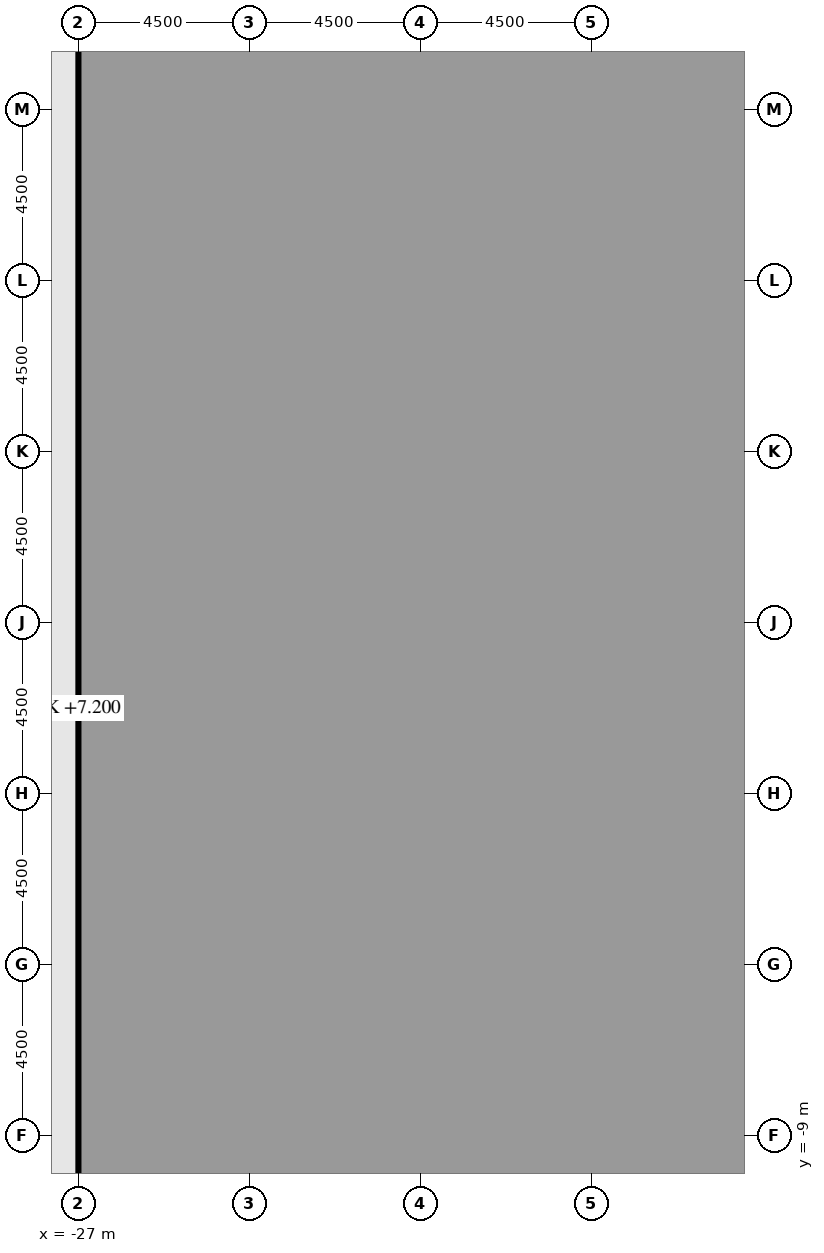
"""IFC4 building model, lengths in metres.
Left out: names, types, materials, properties, quantities, classifications, styles, units other than length and angle.
Written with IfcOpenShell. Run it as: python <this file> out.ifc"""

import sys

from ifc_helpers import new_model, si_unit, direction, frame, frame_2d, origin, origin_2d, place, context, subcontext, project, spatial, rectangle, extrude, element, fill, save


model = new_model("IFC4")
c1 = context("Model", 3, precision=1e-05, world=origin(), true_north=direction((0.0, 1.0)))
c2 = subcontext(c1, "Body", "Model", "MODEL_VIEW")
j1 = project(units=[si_unit("LENGTHUNIT", "METRE"), si_unit("PLANEANGLEUNIT", "RADIAN")], contexts=[c1])
p1 = place(None, origin())
s1 = spatial("IfcSite", under=j1, at=p1, CompositionType="ELEMENT")
p2 = place(p1, origin())
s2 = spatial("IfcBuilding", under=s1, at=p2, CompositionType="ELEMENT")
p3 = place(p2, frame((0.0, 0.0, 7.2)))
s3 = spatial("IfcBuildingStorey", under=s2, at=p3, CompositionType="ELEMENT", Elevation=7.2)
for number, where, z_axis, x_axis in (
    (1, (-27.0, -9.0, -0.45), (0.0, 0.0, 1.0), (1.0, 0.0, 0.0)),
    (2, (-27.0, -4.5, -0.45), (0.0, 0.0, 1.0), (1.0, 0.0, 0.0)),
    (3, (-27.0, 0.0, -0.45), (0.0, 0.0, 1.0), (1.0, 0.0, 0.0)),
    (4, (-27.0, 4.5, -0.45), (0.0, 0.0, 1.0), (1.0, 0.0, 0.0)),
    (5, (-27.0, 9.0, -0.45), (0.0, 0.0, 1.0), (1.0, 0.0, 0.0)),
    (6, (-27.0, 13.5, -0.45), (0.0, 0.0, 1.0), (1.0, 0.0, 0.0)),
    (7, (-27.0, 18.0, -0.45), (0.0, 0.0, 1.0), (1.0, 0.0, 0.0)),
):
    element("IfcColumn", number, at=place(p3, frame(where, z_axis=z_axis, x_axis=x_axis)), inside=s3, PredefinedType="COLUMN", context=c2, shape_type="SweptSolid", body=[
        extrude(rectangle(XDim=1.4, YDim=1.4, at=origin_2d()), origin(), (0.0, 0.0, 1.0), 4.55),
    ])
for number, where, z_axis, x_axis in (
    (8, (-18.0, -9.0, 0.0), (0.0, 0.0, 1.0), (1.0, 0.0, 0.0)),
    (9, (-18.0, 0.0, 0.0), (0.0, 0.0, 1.0), (1.0, 0.0, 0.0)),
    (10, (-18.0, 9.0, 0.0), (0.0, 0.0, 1.0), (1.0, 0.0, 0.0)),
    (11, (-18.0, 18.0, 0.0), (0.0, 0.0, 1.0), (1.0, 0.0, 0.0)),
):
    element("IfcColumn", number, at=place(p3, frame(where, z_axis=z_axis, x_axis=x_axis)), inside=s3, PredefinedType="COLUMN", context=c2, shape_type="SweptSolid", body=[
        extrude(rectangle(XDim=1.6, YDim=1.6, at=origin_2d()), origin(), (0.0, 0.0, 1.0), 4.1),
    ])
p4 = place(p3, frame((-10.0, -9.0, 0.0), z_axis=(0.0, 0.0, 1.0), x_axis=(0.0, 1.0, 0.0)))
e12 = element("IfcWall", 12, at=p4, inside=s3, PredefinedType="SHEAR", context=c2, shape_type="SweptSolid", body=[
    extrude(rectangle(XDim=27.5, YDim=1.0, at=frame_2d((13.75, 0.0))), origin(), (0.0, 0.0, 1.0), 4.1),
])
p5 = place(p4, frame((12.55, 0.0, 0.0)))
e13 = element("IfcOpeningElement", 13, at=p5, cuts=e12, PredefinedType="OPENING", context=c2, shape_type="SweptSolid", body=[
    extrude(rectangle(XDim=2.4, YDim=2.4, at=frame_2d((1.2, 1.2))), frame((0.0, 0.51, 0.0), z_axis=(0.0, -1.0, 0.0), x_axis=(1.0, 0.0, 0.0)), (0.0, 0.0, 1.0), 1.02),
])
p6 = place(p4, frame((6.825, 0.0, 0.0)))
e14 = element("IfcOpeningElement", 14, at=p6, cuts=e12, PredefinedType="OPENING", context=c2, shape_type="SweptSolid", body=[
    extrude(rectangle(XDim=1.2, YDim=2.1, at=frame_2d((0.6, 1.05))), frame((0.0, 0.51, 0.0), z_axis=(0.0, -1.0, 0.0), x_axis=(1.0, 0.0, 0.0)), (0.0, 0.0, 1.0), 1.02),
])
p7 = place(p4, frame((19.475, 0.0, 0.0)))
e15 = element("IfcOpeningElement", 15, at=p7, cuts=e12, PredefinedType="OPENING", context=c2, shape_type="SweptSolid", body=[
    extrude(rectangle(XDim=1.2, YDim=2.1, at=frame_2d((0.6, 1.05))), frame((0.0, 0.51, 0.0), z_axis=(0.0, -1.0, 0.0), x_axis=(1.0, 0.0, 0.0)), (0.0, 0.0, 1.0), 1.02),
])
p8 = place(p3, frame((-27.0, 18.7, 0.0), z_axis=(0.0, 0.0, 1.0), x_axis=(0.0, 1.0, 0.0)))
e16 = element("IfcWall", 16, at=p8, inside=s3, PredefinedType="SOLIDWALL", context=c2, shape_type="SweptSolid", body=[
    extrude(rectangle(XDim=3.1, YDim=0.3, at=frame_2d((1.55, 0.0))), origin(), (0.0, 0.0, 1.0), 2.75),
])
p9 = place(p8, frame((0.125, 0.0, 0.8)))
e17 = element("IfcOpeningElement", 17, at=p9, cuts=e16, PredefinedType="OPENING", context=c2, shape_type="SweptSolid", body=[
    extrude(rectangle(XDim=2.4, YDim=1.7, at=frame_2d((1.2, 0.85))), frame((0.0, 0.16, 0.0), z_axis=(0.0, -1.0, 0.0), x_axis=(1.0, 0.0, 0.0)), (0.0, 0.0, 1.0), 0.32),
])
p10 = place(p3, frame((-27.0, 14.2, 0.0), z_axis=(0.0, 0.0, 1.0), x_axis=(0.0, 1.0, 0.0)))
e18 = element("IfcWall", 18, at=p10, inside=s3, PredefinedType="SOLIDWALL", context=c2, shape_type="SweptSolid", body=[
    extrude(rectangle(XDim=3.1, YDim=0.3, at=frame_2d((1.55, 0.0))), origin(), (0.0, 0.0, 1.0), 2.75),
])
p11 = place(p10, frame((1.05, 0.0, 0.0)))
e19 = element("IfcOpeningElement", 19, at=p11, cuts=e18, PredefinedType="OPENING", context=c2, shape_type="SweptSolid", body=[
    extrude(rectangle(XDim=1.0, YDim=2.2, at=frame_2d((0.5, 1.1))), frame((0.0, 0.16, 0.0), z_axis=(0.0, -1.0, 0.0), x_axis=(1.0, 0.0, 0.0)), (0.0, 0.0, 1.0), 0.32),
])
p12 = place(p3, frame((-27.0, 9.7, 0.0), z_axis=(0.0, 0.0, 1.0), x_axis=(0.0, 1.0, 0.0)))
e20 = element("IfcWall", 20, at=p12, inside=s3, PredefinedType="SOLIDWALL", context=c2, shape_type="SweptSolid", body=[
    extrude(rectangle(XDim=3.1, YDim=0.3, at=frame_2d((1.55, 0.0))), origin(), (0.0, 0.0, 1.0), 2.75),
])
p13 = place(p12, frame((0.35, 0.0, 0.8)))
e21 = element("IfcOpeningElement", 21, at=p13, cuts=e20, PredefinedType="OPENING", context=c2, shape_type="SweptSolid", body=[
    extrude(rectangle(XDim=2.4, YDim=1.7, at=frame_2d((1.2, 0.85))), frame((0.0, 0.16, 0.0), z_axis=(0.0, -1.0, 0.0), x_axis=(1.0, 0.0, 0.0)), (0.0, 0.0, 1.0), 0.32),
])
p14 = place(p3, frame((-27.0, 5.2, 0.0), z_axis=(0.0, 0.0, 1.0), x_axis=(0.0, 1.0, 0.0)))
e22 = element("IfcWall", 22, at=p14, inside=s3, PredefinedType="SOLIDWALL", context=c2, shape_type="SweptSolid", body=[
    extrude(rectangle(XDim=3.1, YDim=0.3, at=frame_2d((1.55, 0.0))), origin(), (0.0, 0.0, 1.0), 2.75),
])
p15 = place(p14, frame((0.35, 0.0, 0.8)))
e23 = element("IfcOpeningElement", 23, at=p15, cuts=e22, PredefinedType="OPENING", context=c2, shape_type="SweptSolid", body=[
    extrude(rectangle(XDim=2.4, YDim=1.7, at=frame_2d((1.2, 0.85))), frame((0.0, 0.16, 0.0), z_axis=(0.0, -1.0, 0.0), x_axis=(1.0, 0.0, 0.0)), (0.0, 0.0, 1.0), 0.32),
])
p16 = place(p3, frame((-27.0, 0.7, 0.0), z_axis=(0.0, 0.0, 1.0), x_axis=(0.0, 1.0, 0.0)))
e24 = element("IfcWall", 24, at=p16, inside=s3, PredefinedType="SOLIDWALL", context=c2, shape_type="SweptSolid", body=[
    extrude(rectangle(XDim=3.1, YDim=0.3, at=frame_2d((1.55, 0.0))), origin(), (0.0, 0.0, 1.0), 2.75),
])
p17 = place(p16, frame((0.35, 0.0, 0.8)))
e25 = element("IfcOpeningElement", 25, at=p17, cuts=e24, PredefinedType="OPENING", context=c2, shape_type="SweptSolid", body=[
    extrude(rectangle(XDim=2.4, YDim=1.7, at=frame_2d((1.2, 0.85))), frame((0.0, 0.16, 0.0), z_axis=(0.0, -1.0, 0.0), x_axis=(1.0, 0.0, 0.0)), (0.0, 0.0, 1.0), 0.32),
])
p18 = place(p3, frame((-27.0, -3.8, 0.0), z_axis=(0.0, 0.0, 1.0), x_axis=(0.0, 1.0, 0.0)))
e26 = element("IfcWall", 26, at=p18, inside=s3, PredefinedType="SOLIDWALL", context=c2, shape_type="SweptSolid", body=[
    extrude(rectangle(XDim=3.1, YDim=0.3, at=frame_2d((1.55, 0.0))), origin(), (0.0, 0.0, 1.0), 2.75),
])
p19 = place(p18, frame((0.35, 0.0, 0.8)))
e27 = element("IfcOpeningElement", 27, at=p19, cuts=e26, PredefinedType="OPENING", context=c2, shape_type="SweptSolid", body=[
    extrude(rectangle(XDim=2.4, YDim=1.7, at=frame_2d((1.2, 0.85))), frame((0.0, 0.16, 0.0), z_axis=(0.0, -1.0, 0.0), x_axis=(1.0, 0.0, 0.0)), (0.0, 0.0, 1.0), 0.32),
])
p20 = place(p3, frame((-27.0, -8.3, 0.0), z_axis=(0.0, 0.0, 1.0), x_axis=(0.0, 1.0, 0.0)))
e28 = element("IfcWall", 28, at=p20, inside=s3, PredefinedType="SOLIDWALL", context=c2, shape_type="SweptSolid", body=[
    extrude(rectangle(XDim=3.1, YDim=0.3, at=frame_2d((1.55, 0.0))), origin(), (0.0, 0.0, 1.0), 2.75),
])
p21 = place(p20, frame((0.35, 0.0, 0.8)))
e29 = element("IfcOpeningElement", 29, at=p21, cuts=e28, PredefinedType="OPENING", context=c2, shape_type="SweptSolid", body=[
    extrude(rectangle(XDim=2.4, YDim=1.7, at=frame_2d((1.2, 0.85))), frame((0.0, 0.16, 0.0), z_axis=(0.0, -1.0, 0.0), x_axis=(1.0, 0.0, 0.0)), (0.0, 0.0, 1.0), 0.32),
])
p22 = place(p3, frame((-27.0, -12.8, 0.0), z_axis=(0.0, 0.0, 1.0), x_axis=(0.0, 1.0, 0.0)))
e30 = element("IfcWall", 30, at=p22, inside=s3, PredefinedType="SOLIDWALL", context=c2, shape_type="SweptSolid", body=[
    extrude(rectangle(XDim=3.1, YDim=0.3, at=frame_2d((1.55, 0.0))), origin(), (0.0, 0.0, 1.0), 2.75),
])
p23 = place(p22, frame((1.425, 0.0, 0.8)))
e31 = element("IfcOpeningElement", 31, at=p23, cuts=e30, PredefinedType="OPENING", context=c2, shape_type="SweptSolid", body=[
    extrude(rectangle(XDim=1.2, YDim=1.7, at=frame_2d((0.6, 0.85))), frame((0.0, 0.16, 0.0), z_axis=(0.0, -1.0, 0.0), x_axis=(1.0, 0.0, 0.0)), (0.0, 0.0, 1.0), 0.32),
])
p24 = place(p3, frame((-19.8, -9.0, 0.0), z_axis=(0.0, 0.0, 1.0), x_axis=(0.0, 1.0, 0.0)))
e32 = element("IfcWall", 32, at=p24, inside=s3, PredefinedType="PARTITIONING", context=c2, shape_type="SweptSolid", body=[
    extrude(rectangle(XDim=27.5, YDim=0.15, at=frame_2d((13.75, 0.0))), origin(), (0.0, 0.0, 1.0), 3.65),
])
p25 = place(p24, frame((2.85, 0.0, 0.0)))
e33 = element("IfcOpeningElement", 33, at=p25, cuts=e32, PredefinedType="OPENING", context=c2, shape_type="SweptSolid", body=[
    extrude(rectangle(XDim=1.0, YDim=2.1, at=frame_2d((0.5, 1.05))), frame((0.0, 0.085, 0.0), z_axis=(0.0, -1.0, 0.0), x_axis=(1.0, 0.0, 0.0)), (0.0, 0.0, 1.0), 0.17),
])
p26 = place(p24, frame((15.85, 0.0, 0.0)))
e34 = element("IfcOpeningElement", 34, at=p26, cuts=e32, PredefinedType="OPENING", context=c2, shape_type="SweptSolid", body=[
    extrude(rectangle(XDim=1.0, YDim=2.1, at=frame_2d((0.5, 1.05))), frame((0.0, 0.085, 0.0), z_axis=(0.0, -1.0, 0.0), x_axis=(1.0, 0.0, 0.0)), (0.0, 0.0, 1.0), 0.17),
])
p27 = place(p24, frame((24.35, 0.0, 0.0)))
e35 = element("IfcOpeningElement", 35, at=p27, cuts=e32, PredefinedType="OPENING", context=c2, shape_type="SweptSolid", body=[
    extrude(rectangle(XDim=1.0, YDim=2.1, at=frame_2d((0.5, 1.05))), frame((0.0, 0.085, 0.0), z_axis=(0.0, -1.0, 0.0), x_axis=(1.0, 0.0, 0.0)), (0.0, 0.0, 1.0), 0.17),
])
p28 = place(p3, frame((-13.5, -9.0, 0.0), z_axis=(0.0, 0.0, 1.0), x_axis=(0.0, 1.0, 0.0)))
e36 = element("IfcWall", 36, at=p28, inside=s3, PredefinedType="PARTITIONING", context=c2, shape_type="SweptSolid", body=[
    extrude(rectangle(XDim=27.5, YDim=0.2, at=frame_2d((13.75, 0.0))), origin(), (0.0, 0.0, 1.0), 3.65),
])
p29 = place(p28, frame((3.85, 0.0, 0.0)))
e37 = element("IfcOpeningElement", 37, at=p29, cuts=e36, PredefinedType="OPENING", context=c2, shape_type="SweptSolid", body=[
    extrude(rectangle(XDim=1.0, YDim=2.1, at=frame_2d((0.5, 1.05))), frame((0.0, 0.11, 0.0), z_axis=(0.0, -1.0, 0.0), x_axis=(1.0, 0.0, 0.0)), (0.0, 0.0, 1.0), 0.22),
])
p30 = place(p28, frame((15.1, 0.0, 0.0)))
e38 = element("IfcOpeningElement", 38, at=p30, cuts=e36, PredefinedType="OPENING", context=c2, shape_type="SweptSolid", body=[
    extrude(rectangle(XDim=1.0, YDim=2.1, at=frame_2d((0.5, 1.05))), frame((0.0, 0.11, 0.0), z_axis=(0.0, -1.0, 0.0), x_axis=(1.0, 0.0, 0.0)), (0.0, 0.0, 1.0), 0.22),
])
p31 = place(p3, frame((-26.3, -9.0, 0.0), z_axis=(0.0, 0.0, 1.0), x_axis=(1.0, 0.0, 0.0)))
e39 = element("IfcWall", 39, at=p31, inside=s3, PredefinedType="PARTITIONING", context=c2, shape_type="SweptSolid", body=[
    extrude(rectangle(XDim=7.5, YDim=0.2, at=frame_2d((3.75, 0.0))), origin(), (0.0, 0.0, 1.0), 3.65),
])
p32 = place(p3, frame((-17.2, -9.0, 0.0), z_axis=(0.0, 0.0, 1.0), x_axis=(1.0, 0.0, 0.0)))
e40 = element("IfcWall", 40, at=p32, inside=s3, PredefinedType="PARTITIONING", context=c2, shape_type="SweptSolid", body=[
    extrude(rectangle(XDim=3.7, YDim=0.2, at=frame_2d((1.85, 0.0))), origin(), (0.0, 0.0, 1.0), 3.65),
])
p33 = place(p3, frame((-26.3, 0.0, 0.0), z_axis=(0.0, 0.0, 1.0), x_axis=(1.0, 0.0, 0.0)))
e41 = element("IfcWall", 41, at=p33, inside=s3, PredefinedType="PARTITIONING", context=c2, shape_type="SweptSolid", body=[
    extrude(rectangle(XDim=7.5, YDim=0.2, at=frame_2d((3.75, 0.0))), origin(), (0.0, 0.0, 1.0), 3.65),
])
p34 = place(p3, frame((-17.2, 0.0, 0.0), z_axis=(0.0, 0.0, 1.0), x_axis=(1.0, 0.0, 0.0)))
e42 = element("IfcWall", 42, at=p34, inside=s3, PredefinedType="PARTITIONING", context=c2, shape_type="SweptSolid", body=[
    extrude(rectangle(XDim=3.7, YDim=0.2, at=frame_2d((1.85, 0.0))), origin(), (0.0, 0.0, 1.0), 3.65),
])
p35 = place(p3, frame((-26.3, 13.5, 0.0), z_axis=(0.0, 0.0, 1.0), x_axis=(1.0, 0.0, 0.0)))
e43 = element("IfcWall", 43, at=p35, inside=s3, PredefinedType="PARTITIONING", context=c2, shape_type="SweptSolid", body=[
    extrude(rectangle(XDim=12.8, YDim=0.2, at=frame_2d((6.4, 0.0))), origin(), (0.0, 0.0, 1.0), 3.65),
])
p36 = place(p3, frame((-18.8, 18.5, 0.0), z_axis=(0.0, 0.0, 1.0), x_axis=(-1.0, 0.0, 0.0)))
e44 = element("IfcWall", 44, at=p36, inside=s3, PredefinedType="PARTITIONING", context=c2, shape_type="SweptSolid", body=[
    extrude(rectangle(XDim=7.5, YDim=0.2, at=frame_2d((3.75, 0.0))), origin(), (0.0, 0.0, 1.0), 3.65),
])
p37 = place(p36, frame((4.6, 0.0, 0.0)))
e45 = element("IfcOpeningElement", 45, at=p37, cuts=e44, PredefinedType="OPENING", context=c2, shape_type="SweptSolid", body=[
    extrude(rectangle(XDim=1.0, YDim=2.1, at=frame_2d((0.5, 1.05))), frame((0.0, 0.11, 0.0), z_axis=(0.0, -1.0, 0.0), x_axis=(1.0, 0.0, 0.0)), (0.0, 0.0, 1.0), 0.22),
])
p38 = place(p3, frame((-17.2, 18.5, 0.0), z_axis=(0.0, 0.0, 1.0), x_axis=(1.0, 0.0, 0.0)))
e46 = element("IfcWall", 46, at=p38, inside=s3, PredefinedType="PARTITIONING", context=c2, shape_type="SweptSolid", body=[
    extrude(rectangle(XDim=3.7, YDim=0.2, at=frame_2d((1.85, 0.0))), origin(), (0.0, 0.0, 1.0), 3.65),
])
p39 = place(p9, origin())
e47 = element("IfcWindow", 47, at=p39, inside=s3, PartitioningType="SINGLE_PANEL", PredefinedType="WINDOW", context=c2, shape_type="SweptSolid", body=[
    extrude(rectangle(XDim=2.4, YDim=1.7, at=frame_2d((1.2, 0.85))), frame((0.0, 0.03, 0.0), z_axis=(0.0, -1.0, 0.0), x_axis=(1.0, 0.0, 0.0)), (0.0, 0.0, 1.0), 0.06),
])
fill(e17, e47)
p40 = place(p11, origin())
e48 = element("IfcDoor", 48, at=p40, inside=s3, OperationType="SINGLE_SWING_LEFT", PredefinedType="DOOR", context=c2, shape_type="SweptSolid", body=[
    extrude(rectangle(XDim=1.0, YDim=2.2, at=frame_2d((0.5, 1.1))), frame((0.0, 0.025, 0.0), z_axis=(0.0, -1.0, 0.0), x_axis=(1.0, 0.0, 0.0)), (0.0, 0.0, 1.0), 0.05),
])
fill(e19, e48)
p41 = place(p13, origin())
e49 = element("IfcWindow", 49, at=p41, inside=s3, PartitioningType="SINGLE_PANEL", PredefinedType="WINDOW", context=c2, shape_type="SweptSolid", body=[
    extrude(rectangle(XDim=2.4, YDim=1.7, at=frame_2d((1.2, 0.85))), frame((0.0, 0.03, 0.0), z_axis=(0.0, -1.0, 0.0), x_axis=(1.0, 0.0, 0.0)), (0.0, 0.0, 1.0), 0.06),
])
fill(e21, e49)
p42 = place(p15, origin())
e50 = element("IfcWindow", 50, at=p42, inside=s3, PartitioningType="SINGLE_PANEL", PredefinedType="WINDOW", context=c2, shape_type="SweptSolid", body=[
    extrude(rectangle(XDim=2.4, YDim=1.7, at=frame_2d((1.2, 0.85))), frame((0.0, 0.03, 0.0), z_axis=(0.0, -1.0, 0.0), x_axis=(1.0, 0.0, 0.0)), (0.0, 0.0, 1.0), 0.06),
])
fill(e23, e50)
p43 = place(p17, origin())
e51 = element("IfcWindow", 51, at=p43, inside=s3, PartitioningType="SINGLE_PANEL", PredefinedType="WINDOW", context=c2, shape_type="SweptSolid", body=[
    extrude(rectangle(XDim=2.4, YDim=1.7, at=frame_2d((1.2, 0.85))), frame((0.0, 0.03, 0.0), z_axis=(0.0, -1.0, 0.0), x_axis=(1.0, 0.0, 0.0)), (0.0, 0.0, 1.0), 0.06),
])
fill(e25, e51)
p44 = place(p19, origin())
e52 = element("IfcWindow", 52, at=p44, inside=s3, PartitioningType="SINGLE_PANEL", PredefinedType="WINDOW", context=c2, shape_type="SweptSolid", body=[
    extrude(rectangle(XDim=2.4, YDim=1.7, at=frame_2d((1.2, 0.85))), frame((0.0, 0.03, 0.0), z_axis=(0.0, -1.0, 0.0), x_axis=(1.0, 0.0, 0.0)), (0.0, 0.0, 1.0), 0.06),
])
fill(e27, e52)
p45 = place(p21, origin())
e53 = element("IfcWindow", 53, at=p45, inside=s3, PartitioningType="SINGLE_PANEL", PredefinedType="WINDOW", context=c2, shape_type="SweptSolid", body=[
    extrude(rectangle(XDim=2.4, YDim=1.7, at=frame_2d((1.2, 0.85))), frame((0.0, 0.03, 0.0), z_axis=(0.0, -1.0, 0.0), x_axis=(1.0, 0.0, 0.0)), (0.0, 0.0, 1.0), 0.06),
])
fill(e29, e53)
p46 = place(p5, origin())
e54 = element("IfcDoor", 54, at=p46, inside=s3, OperationType="DOUBLE_DOOR_DOUBLE_SWING", PredefinedType="DOOR", context=c2, shape_type="SweptSolid", body=[
    extrude(rectangle(XDim=2.4, YDim=2.4, at=frame_2d((1.2, 1.2))), frame((0.0, 0.025, 0.0), z_axis=(0.0, -1.0, 0.0), x_axis=(1.0, 0.0, 0.0)), (0.0, 0.0, 1.0), 0.05),
])
fill(e13, e54)
p47 = place(p6, origin())
e55 = element("IfcDoor", 55, at=p47, inside=s3, OperationType="SINGLE_SWING_LEFT", PredefinedType="DOOR", context=c2, shape_type="SweptSolid", body=[
    extrude(rectangle(XDim=1.2, YDim=2.1, at=frame_2d((0.6, 1.05))), frame((0.0, 0.025, 0.0), z_axis=(0.0, -1.0, 0.0), x_axis=(1.0, 0.0, 0.0)), (0.0, 0.0, 1.0), 0.05),
])
fill(e14, e55)
p48 = place(p7, origin())
e56 = element("IfcDoor", 56, at=p48, inside=s3, OperationType="SINGLE_SWING_LEFT", PredefinedType="DOOR", context=c2, shape_type="SweptSolid", body=[
    extrude(rectangle(XDim=1.2, YDim=2.1, at=frame_2d((0.6, 1.05))), frame((0.0, 0.025, 0.0), z_axis=(0.0, -1.0, 0.0), x_axis=(1.0, 0.0, 0.0)), (0.0, 0.0, 1.0), 0.05),
])
fill(e15, e56)
p49 = place(p25, origin())
e57 = element("IfcDoor", 57, at=p49, inside=s3, OperationType="SINGLE_SWING_LEFT", PredefinedType="DOOR", context=c2, shape_type="SweptSolid", body=[
    extrude(rectangle(XDim=1.0, YDim=2.1, at=frame_2d((0.5, 1.05))), frame((0.0, 0.025, 0.0), z_axis=(0.0, -1.0, 0.0), x_axis=(1.0, 0.0, 0.0)), (0.0, 0.0, 1.0), 0.05),
])
fill(e33, e57)
p50 = place(p26, origin())
e58 = element("IfcDoor", 58, at=p50, inside=s3, OperationType="SINGLE_SWING_RIGHT", PredefinedType="DOOR", context=c2, shape_type="SweptSolid", body=[
    extrude(rectangle(XDim=1.0, YDim=2.1, at=frame_2d((0.5, 1.05))), frame((0.0, 0.025, 0.0), z_axis=(0.0, -1.0, 0.0), x_axis=(1.0, 0.0, 0.0)), (0.0, 0.0, 1.0), 0.05),
])
fill(e34, e58)
p51 = place(p27, origin())
e59 = element("IfcDoor", 59, at=p51, inside=s3, OperationType="SINGLE_SWING_RIGHT", PredefinedType="DOOR", context=c2, shape_type="SweptSolid", body=[
    extrude(rectangle(XDim=1.0, YDim=2.1, at=frame_2d((0.5, 1.05))), frame((0.0, 0.025, 0.0), z_axis=(0.0, -1.0, 0.0), x_axis=(1.0, 0.0, 0.0)), (0.0, 0.0, 1.0), 0.05),
])
fill(e35, e59)
p52 = place(p29, origin())
e60 = element("IfcDoor", 60, at=p52, inside=s3, OperationType="SINGLE_SWING_LEFT", PredefinedType="DOOR", context=c2, shape_type="SweptSolid", body=[
    extrude(rectangle(XDim=1.0, YDim=2.1, at=frame_2d((0.5, 1.05))), frame((0.0, 0.025, 0.0), z_axis=(0.0, -1.0, 0.0), x_axis=(1.0, 0.0, 0.0)), (0.0, 0.0, 1.0), 0.05),
])
fill(e37, e60)
p53 = place(p30, origin())
e61 = element("IfcDoor", 61, at=p53, inside=s3, OperationType="SINGLE_SWING_RIGHT", PredefinedType="DOOR", context=c2, shape_type="SweptSolid", body=[
    extrude(rectangle(XDim=1.0, YDim=2.1, at=frame_2d((0.5, 1.05))), frame((0.0, 0.025, 0.0), z_axis=(0.0, -1.0, 0.0), x_axis=(1.0, 0.0, 0.0)), (0.0, 0.0, 1.0), 0.05),
])
fill(e38, e61)
p54 = place(p37, origin())
e62 = element("IfcDoor", 62, at=p54, inside=s3, OperationType="SINGLE_SWING_RIGHT", PredefinedType="DOOR", context=c2, shape_type="SweptSolid", body=[
    extrude(rectangle(XDim=1.0, YDim=2.1, at=frame_2d((0.5, 1.05))), frame((0.0, 0.025, 0.0), z_axis=(0.0, -1.0, 0.0), x_axis=(1.0, 0.0, 0.0)), (0.0, 0.0, 1.0), 0.05),
])
fill(e45, e62)
save(model, sys.argv[1])
